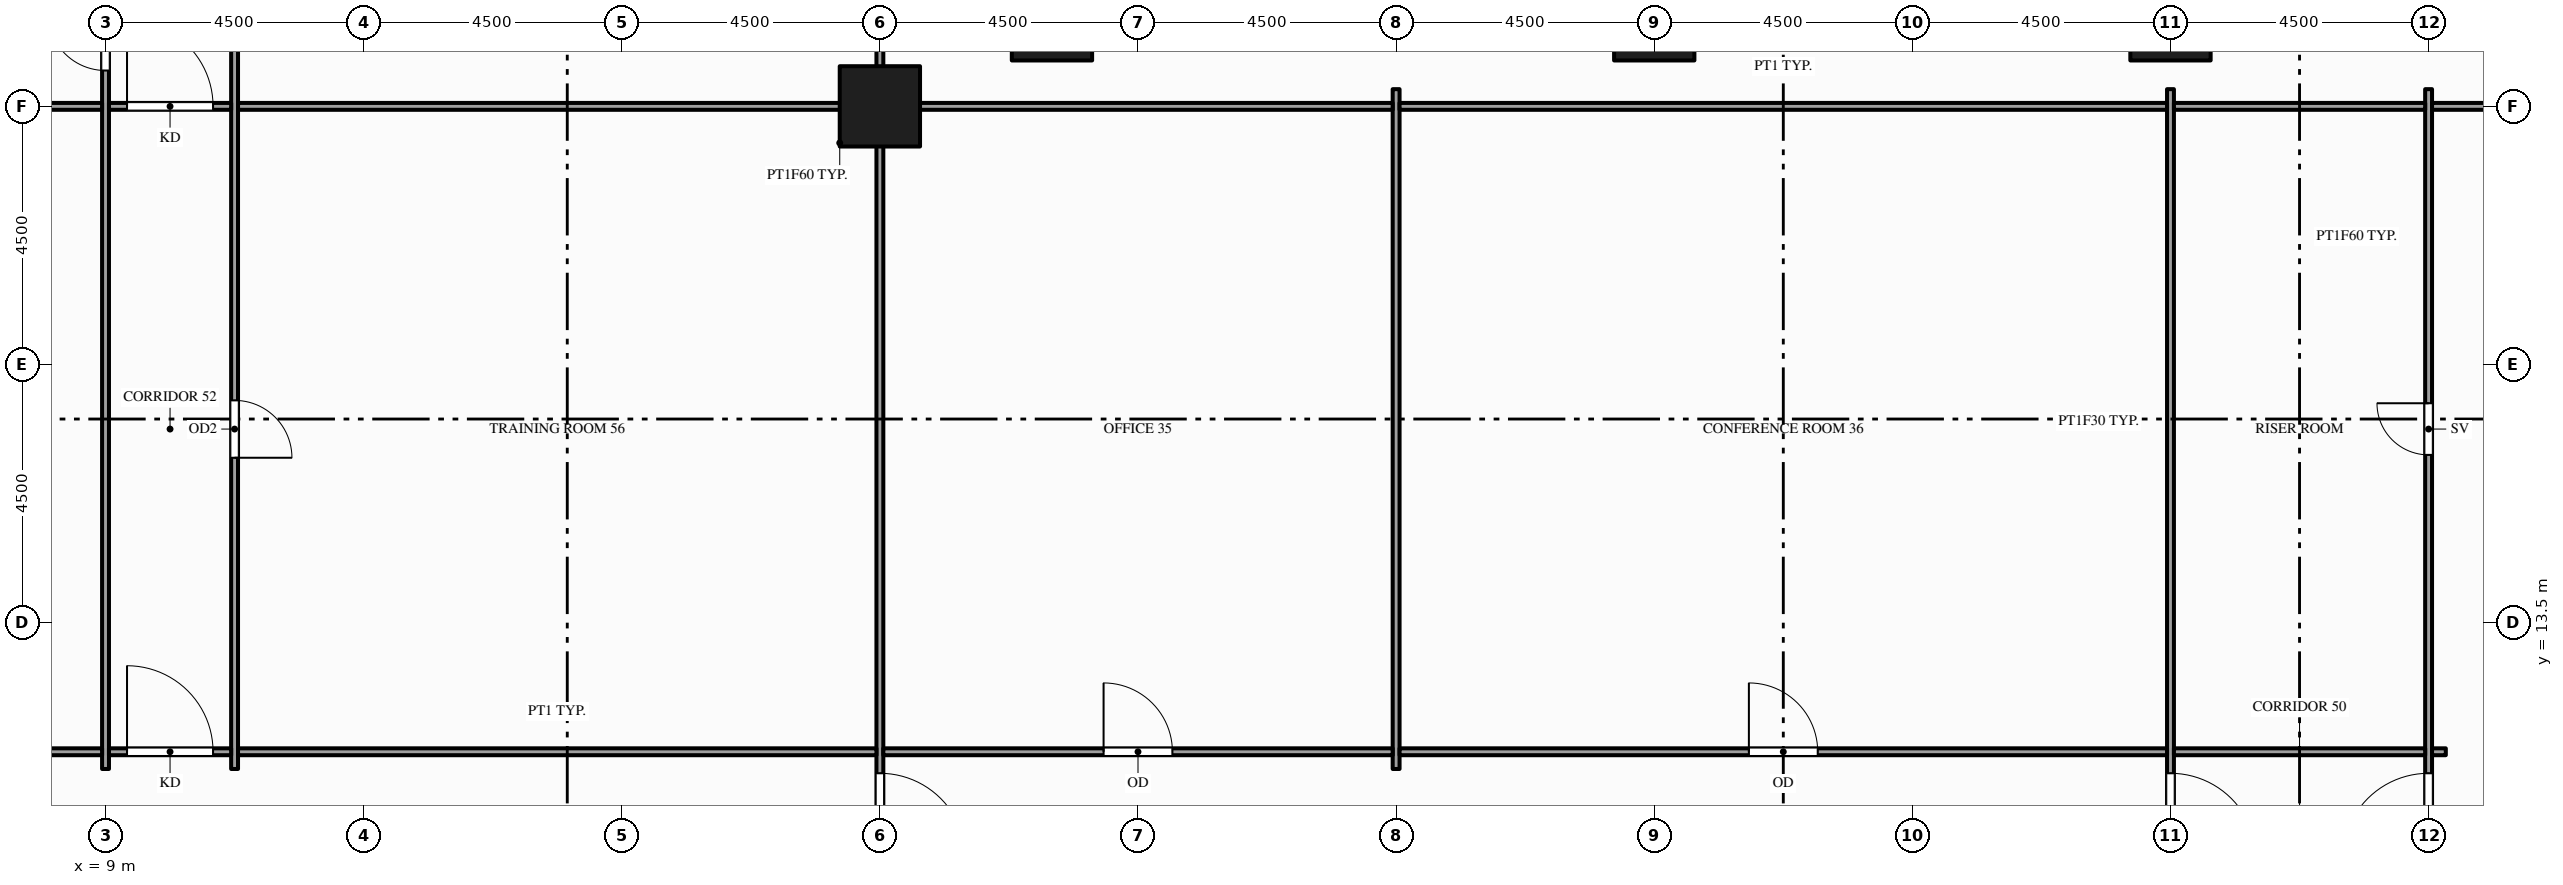
"""IFC4 building model, lengths in metres.
Left out: names, types, materials, properties, quantities, classifications, styles, units other than length and angle.
Written with IfcOpenShell. Run it as: python <this file> out.ifc"""

import sys

from ifc_helpers import new_model, si_unit, direction, frame, frame_2d, origin, origin_2d, place, context, subcontext, project, spatial, rectangle, hollow_rectangle, extrude, element, fill, save


model = new_model("IFC4")
c1 = context("Model", 3, precision=1e-05, world=origin(), true_north=direction((0.0, 1.0)))
c2 = subcontext(c1, "Body", "Model", "MODEL_VIEW")
j1 = project(units=[si_unit("LENGTHUNIT", "METRE"), si_unit("PLANEANGLEUNIT", "RADIAN")], contexts=[c1])
p1 = place(None, origin())
s1 = spatial("IfcSite", under=j1, at=p1, CompositionType="ELEMENT")
p2 = place(p1, origin())
s2 = spatial("IfcBuilding", under=s1, at=p2, CompositionType="ELEMENT")
p3 = place(p2, frame((0.0, 0.0, 8.0)))
s3 = spatial("IfcBuildingStorey", under=s2, at=p3, CompositionType="ELEMENT", Elevation=8.0)
for number, where, z_axis, x_axis in (
    (1, (22.5, 22.5, -0.25), (0.0, 0.0, 1.0), (1.0, 0.0, 0.0)),
    (2, (25.5, 24.0, -0.25), (0.0, 0.0, 1.0), (1.0, 0.0, 0.0)),
    (3, (36.0, 24.0, -0.25), (0.0, 0.0, 1.0), (1.0, 0.0, 0.0)),
    (4, (45.0, 24.0, -0.25), (0.0, 0.0, 1.0), (1.0, 0.0, 0.0)),
):
    element("IfcColumn", number, at=place(p3, frame(where, z_axis=z_axis, x_axis=x_axis)), inside=s3, PredefinedType="COLUMN", context=c2, shape_type="SweptSolid", body=[
        extrude(hollow_rectangle(XDim=1.4, YDim=1.4, WallThickness=0.08, at=origin_2d()), origin(), (0.0, 0.0, 1.0), 6.0),
    ])
p4 = place(p3, frame((9.0, 10.95, 0.0), z_axis=(0.0, 0.0, 1.0), x_axis=(0.0, 1.0, 0.0)))
e5 = element("IfcWall", 5, at=p4, inside=s3, PredefinedType="PARTITIONING", context=c2, shape_type="SweptSolid", body=[
    extrude(rectangle(XDim=20.85, YDim=0.12, at=frame_2d((10.425, 0.0))), origin(), (0.0, 0.0, 1.0), 4.5),
])
p5 = place(p4, frame((12.175, 0.0, 0.0)))
e6 = element("IfcOpeningElement", 6, at=p5, cuts=e5, PredefinedType="OPENING", context=c2, shape_type="SweptSolid", body=[
    extrude(rectangle(XDim=1.0, YDim=2.1, at=frame_2d((0.5, 1.05))), frame((0.0, 0.07, 0.0), z_axis=(0.0, -1.0, 0.0), x_axis=(1.0, 0.0, 0.0)), (0.0, 0.0, 1.0), 0.14),
])
p6 = place(p4, frame((15.55, 0.0, 0.0)))
e7 = element("IfcOpeningElement", 7, at=p6, cuts=e5, PredefinedType="OPENING", context=c2, shape_type="SweptSolid", body=[
    extrude(rectangle(XDim=1.0, YDim=2.1, at=frame_2d((0.5, 1.05))), frame((0.0, 0.07, 0.0), z_axis=(0.0, -1.0, 0.0), x_axis=(1.0, 0.0, 0.0)), (0.0, 0.0, 1.0), 0.14),
])
p7 = place(p4, frame((18.925, 0.0, 0.0)))
e8 = element("IfcOpeningElement", 8, at=p7, cuts=e5, PredefinedType="OPENING", context=c2, shape_type="SweptSolid", body=[
    extrude(rectangle(XDim=1.0, YDim=2.1, at=frame_2d((0.5, 1.05))), frame((0.0, 0.07, 0.0), z_axis=(0.0, -1.0, 0.0), x_axis=(1.0, 0.0, 0.0)), (0.0, 0.0, 1.0), 0.14),
])
p8 = place(p3, frame((11.25, 10.95, 0.0), z_axis=(0.0, 0.0, 1.0), x_axis=(0.0, 1.0, 0.0)))
e9 = element("IfcWall", 9, at=p8, inside=s3, PredefinedType="PARTITIONING", context=c2, shape_type="SweptSolid", body=[
    extrude(rectangle(XDim=20.85, YDim=0.12, at=frame_2d((10.425, 0.0))), origin(), (0.0, 0.0, 1.0), 4.5),
])
p9 = place(p8, frame((5.425, 0.0, 0.0)))
e10 = element("IfcOpeningElement", 10, at=p9, cuts=e9, PredefinedType="OPENING", context=c2, shape_type="SweptSolid", body=[
    extrude(rectangle(XDim=1.0, YDim=2.1, at=frame_2d((0.5, 1.05))), frame((0.0, 0.07, 0.0), z_axis=(0.0, -1.0, 0.0), x_axis=(1.0, 0.0, 0.0)), (0.0, 0.0, 1.0), 0.14),
])
p10 = place(p8, frame((13.3, 0.0, 0.0)))
e11 = element("IfcOpeningElement", 11, at=p10, cuts=e9, PredefinedType="OPENING", context=c2, shape_type="SweptSolid", body=[
    extrude(rectangle(XDim=1.0, YDim=2.1, at=frame_2d((0.5, 1.05))), frame((0.0, 0.07, 0.0), z_axis=(0.0, -1.0, 0.0), x_axis=(1.0, 0.0, 0.0)), (0.0, 0.0, 1.0), 0.14),
])
p11 = place(p8, frame((17.8, 0.0, 0.0)))
e12 = element("IfcOpeningElement", 12, at=p11, cuts=e9, PredefinedType="OPENING", context=c2, shape_type="SweptSolid", body=[
    extrude(rectangle(XDim=1.0, YDim=2.1, at=frame_2d((0.5, 1.05))), frame((0.0, 0.07, 0.0), z_axis=(0.0, -1.0, 0.0), x_axis=(1.0, 0.0, 0.0)), (0.0, 0.0, 1.0), 0.14),
])
p12 = place(p3, frame((22.5, 0.15, 0.0), z_axis=(0.0, 0.0, 1.0), x_axis=(0.0, 1.0, 0.0)))
e13 = element("IfcWall", 13, at=p12, inside=s3, PredefinedType="PARTITIONING", context=c2, shape_type="SweptSolid", body=[
    extrude(rectangle(XDim=35.95, YDim=0.12, at=frame_2d((17.975, 0.0))), origin(), (0.0, 0.0, 1.0), 4.759),
])
p13 = place(p12, frame((9.225, 0.0, 0.0)))
e14 = element("IfcOpeningElement", 14, at=p13, cuts=e13, PredefinedType="OPENING", context=c2, shape_type="SweptSolid", body=[
    extrude(rectangle(XDim=1.5, YDim=2.1, at=frame_2d((0.75, 1.05))), frame((0.0, 0.07, 0.0), z_axis=(0.0, -1.0, 0.0), x_axis=(1.0, 0.0, 0.0)), (0.0, 0.0, 1.0), 0.14),
])
p14 = place(p12, frame((32.7, 0.0, 0.0)))
e15 = element("IfcOpeningElement", 15, at=p14, cuts=e13, PredefinedType="OPENING", context=c2, shape_type="SweptSolid", body=[
    extrude(rectangle(XDim=1.8, YDim=2.1, at=frame_2d((0.9, 1.05))), frame((0.0, 0.07, 0.0), z_axis=(0.0, -1.0, 0.0), x_axis=(1.0, 0.0, 0.0)), (0.0, 0.0, 1.0), 0.14),
])
p15 = place(p3, frame((31.5, 10.95, 0.0), z_axis=(0.0, 0.0, 1.0), x_axis=(0.0, 1.0, 0.0)))
e16 = element("IfcWall", 16, at=p15, inside=s3, PredefinedType="PARTITIONING", context=c2, shape_type="SweptSolid", body=[
    extrude(rectangle(XDim=11.85, YDim=0.12, at=frame_2d((5.925, 0.0))), origin(), (0.0, 0.0, 1.0), 4.759),
])
p16 = place(p3, frame((45.0, 0.15, 0.0), z_axis=(0.0, 0.0, 1.0), x_axis=(0.0, 1.0, 0.0)))
e17 = element("IfcWall", 17, at=p16, inside=s3, PredefinedType="PARTITIONING", context=c2, shape_type="SweptSolid", body=[
    extrude(rectangle(XDim=22.65, YDim=0.12, at=frame_2d((11.325, 0.0))), origin(), (0.0, 0.0, 1.0), 4.759),
])
p17 = place(p16, frame((9.225, 0.0, 0.0)))
e18 = element("IfcOpeningElement", 18, at=p17, cuts=e17, PredefinedType="OPENING", context=c2, shape_type="SweptSolid", body=[
    extrude(rectangle(XDim=1.5, YDim=2.1, at=frame_2d((0.75, 1.05))), frame((0.0, 0.07, 0.0), z_axis=(0.0, -1.0, 0.0), x_axis=(1.0, 0.0, 0.0)), (0.0, 0.0, 1.0), 0.14),
])
p18 = place(p3, frame((49.5, 0.15, 0.0), z_axis=(0.0, 0.0, 1.0), x_axis=(0.0, 1.0, 0.0)))
e19 = element("IfcWall", 19, at=p18, inside=s3, PredefinedType="PARTITIONING", context=c2, shape_type="SweptSolid", body=[
    extrude(rectangle(XDim=22.65, YDim=0.12, at=frame_2d((11.325, 0.0))), origin(), (0.0, 0.0, 1.0), 4.759),
])
p19 = place(p18, frame((0.955, 0.0, 0.0)))
e20 = element("IfcOpeningElement", 20, at=p19, cuts=e19, PredefinedType="OPENING", context=c2, shape_type="SweptSolid", body=[
    extrude(rectangle(XDim=0.9, YDim=2.1, at=frame_2d((0.45, 1.05))), frame((0.0, 0.07, 0.0), z_axis=(0.0, -1.0, 0.0), x_axis=(1.0, 0.0, 0.0)), (0.0, 0.0, 1.0), 0.14),
])
p20 = place(p18, frame((3.9, 0.0, 0.0)))
e21 = element("IfcOpeningElement", 21, at=p20, cuts=e19, PredefinedType="OPENING", context=c2, shape_type="SweptSolid", body=[
    extrude(rectangle(XDim=0.9, YDim=2.1, at=frame_2d((0.45, 1.05))), frame((0.0, 0.07, 0.0), z_axis=(0.0, -1.0, 0.0), x_axis=(1.0, 0.0, 0.0)), (0.0, 0.0, 1.0), 0.14),
])
p21 = place(p18, frame((6.85, 0.0, 0.0)))
e22 = element("IfcOpeningElement", 22, at=p21, cuts=e19, PredefinedType="OPENING", context=c2, shape_type="SweptSolid", body=[
    extrude(rectangle(XDim=1.0, YDim=2.1, at=frame_2d((0.5, 1.05))), frame((0.0, 0.07, 0.0), z_axis=(0.0, -1.0, 0.0), x_axis=(1.0, 0.0, 0.0)), (0.0, 0.0, 1.0), 0.14),
])
p22 = place(p18, frame((16.275, 0.0, 0.0)))
e23 = element("IfcOpeningElement", 23, at=p22, cuts=e19, PredefinedType="OPENING", context=c2, shape_type="SweptSolid", body=[
    extrude(rectangle(XDim=0.9, YDim=2.1, at=frame_2d((0.45, 1.05))), frame((0.0, 0.07, 0.0), z_axis=(0.0, -1.0, 0.0), x_axis=(1.0, 0.0, 0.0)), (0.0, 0.0, 1.0), 0.14),
])
p23 = place(p18, frame((9.225, 0.0, 0.0)))
e24 = element("IfcOpeningElement", 24, at=p23, cuts=e19, PredefinedType="OPENING", context=c2, shape_type="SweptSolid", body=[
    extrude(rectangle(XDim=1.5, YDim=2.1, at=frame_2d((0.75, 1.05))), frame((0.0, 0.07, 0.0), z_axis=(0.0, -1.0, 0.0), x_axis=(1.0, 0.0, 0.0)), (0.0, 0.0, 1.0), 0.14),
])
p24 = place(p3, frame((0.15, 11.25, 0.0), z_axis=(0.0, 0.0, 1.0), x_axis=(1.0, 0.0, 0.0)))
e25 = element("IfcWall", 25, at=p24, inside=s3, PredefinedType="PARTITIONING", context=c2, shape_type="SweptSolid", body=[
    extrude(rectangle(XDim=8.79, YDim=0.12, at=frame_2d((4.395, 0.0))), origin(), (0.0, 0.0, 1.0), 4.759),
])
p25 = place(p24, frame((3.905, 0.0, 0.0)))
e26 = element("IfcOpeningElement", 26, at=p25, cuts=e25, PredefinedType="OPENING", context=c2, shape_type="SweptSolid", body=[
    extrude(rectangle(XDim=1.0, YDim=2.1, at=frame_2d((0.5, 1.05))), frame((0.0, 0.07, 0.0), z_axis=(0.0, -1.0, 0.0), x_axis=(1.0, 0.0, 0.0)), (0.0, 0.0, 1.0), 0.14),
])
p26 = place(p3, frame((9.06, 11.25, 0.0), z_axis=(0.0, 0.0, 1.0), x_axis=(1.0, 0.0, 0.0)))
e27 = element("IfcWall", 27, at=p26, inside=s3, PredefinedType="PARTITIONING", context=c2, shape_type="SweptSolid", body=[
    extrude(rectangle(XDim=2.13, YDim=0.12, at=frame_2d((1.065, 0.0))), origin(), (0.0, 0.0, 1.0), 4.759),
])
p27 = place(p26, frame((0.315, 0.0, 0.0)))
e28 = element("IfcOpeningElement", 28, at=p27, cuts=e27, PredefinedType="OPENING", context=c2, shape_type="SweptSolid", body=[
    extrude(rectangle(XDim=1.5, YDim=2.1, at=frame_2d((0.75, 1.05))), frame((0.0, 0.07, 0.0), z_axis=(0.0, -1.0, 0.0), x_axis=(1.0, 0.0, 0.0)), (0.0, 0.0, 1.0), 0.14),
])
p28 = place(p3, frame((11.31, 11.25, 0.0), z_axis=(0.0, 0.0, 1.0), x_axis=(1.0, 0.0, 0.0)))
e29 = element("IfcWall", 29, at=p28, inside=s3, PredefinedType="PARTITIONING", context=c2, shape_type="SweptSolid", body=[
    extrude(rectangle(XDim=11.13, YDim=0.12, at=frame_2d((5.565, 0.0))), origin(), (0.0, 0.0, 1.0), 4.759),
])
p29 = place(p3, frame((22.56, 11.25, 0.0), z_axis=(0.0, 0.0, 1.0), x_axis=(1.0, 0.0, 0.0)))
e30 = element("IfcWall", 30, at=p29, inside=s3, PredefinedType="PARTITIONING", context=c2, shape_type="SweptSolid", body=[
    extrude(rectangle(XDim=8.88, YDim=0.12, at=frame_2d((4.44, 0.0))), origin(), (0.0, 0.0, 1.0), 4.66),
])
p30 = place(p29, frame((3.84, 0.0, 0.0)))
e31 = element("IfcOpeningElement", 31, at=p30, cuts=e30, PredefinedType="OPENING", context=c2, shape_type="SweptSolid", body=[
    extrude(rectangle(XDim=1.2, YDim=2.1, at=frame_2d((0.6, 1.05))), frame((0.0, 0.07, 0.0), z_axis=(0.0, -1.0, 0.0), x_axis=(1.0, 0.0, 0.0)), (0.0, 0.0, 1.0), 0.14),
])
p31 = place(p3, frame((31.56, 11.25, 0.0), z_axis=(0.0, 0.0, 1.0), x_axis=(1.0, 0.0, 0.0)))
e32 = element("IfcWall", 32, at=p31, inside=s3, PredefinedType="PARTITIONING", context=c2, shape_type="SweptSolid", body=[
    extrude(rectangle(XDim=13.38, YDim=0.12, at=frame_2d((6.69, 0.0))), origin(), (0.0, 0.0, 1.0), 4.66),
])
p32 = place(p31, frame((6.09, 0.0, 0.0)))
e33 = element("IfcOpeningElement", 33, at=p32, cuts=e32, PredefinedType="OPENING", context=c2, shape_type="SweptSolid", body=[
    extrude(rectangle(XDim=1.2, YDim=2.1, at=frame_2d((0.6, 1.05))), frame((0.0, 0.07, 0.0), z_axis=(0.0, -1.0, 0.0), x_axis=(1.0, 0.0, 0.0)), (0.0, 0.0, 1.0), 0.14),
])
p33 = place(p3, frame((45.06, 11.25, 0.0), z_axis=(0.0, 0.0, 1.0), x_axis=(1.0, 0.0, 0.0)))
e34 = element("IfcWall", 34, at=p33, inside=s3, PredefinedType="PARTITIONING", context=c2, shape_type="SweptSolid", body=[
    extrude(rectangle(XDim=4.38, YDim=0.12, at=frame_2d((2.19, 0.0))), origin(), (0.0, 0.0, 1.0), 4.66),
])
p34 = place(p3, frame((49.56, 11.25, 0.0), z_axis=(0.0, 0.0, 1.0), x_axis=(1.0, 0.0, 0.0)))
e35 = element("IfcWall", 35, at=p34, inside=s3, PredefinedType="PARTITIONING", context=c2, shape_type="SweptSolid", body=[
    extrude(rectangle(XDim=0.24, YDim=0.12, at=frame_2d((0.12, 0.0))), origin(), (0.0, 0.0, 1.0), 4.759),
])
p35 = place(p3, frame((0.15, 22.5, 0.0), z_axis=(0.0, 0.0, 1.0), x_axis=(1.0, 0.0, 0.0)))
e36 = element("IfcWall", 36, at=p35, inside=s3, PredefinedType="PARTITIONING", context=c2, shape_type="SweptSolid", body=[
    extrude(rectangle(XDim=8.79, YDim=0.12, at=frame_2d((4.395, 0.0))), origin(), (0.0, 0.0, 1.0), 4.5),
])
p36 = place(p3, frame((9.06, 22.5, 0.0), z_axis=(0.0, 0.0, 1.0), x_axis=(1.0, 0.0, 0.0)))
e37 = element("IfcWall", 37, at=p36, inside=s3, PredefinedType="PARTITIONING", context=c2, shape_type="SweptSolid", body=[
    extrude(rectangle(XDim=2.13, YDim=0.12, at=frame_2d((1.065, 0.0))), origin(), (0.0, 0.0, 1.0), 4.5),
])
p37 = place(p36, frame((0.315, 0.0, 0.0)))
e38 = element("IfcOpeningElement", 38, at=p37, cuts=e37, PredefinedType="OPENING", context=c2, shape_type="SweptSolid", body=[
    extrude(rectangle(XDim=1.5, YDim=2.1, at=frame_2d((0.75, 1.05))), frame((0.0, 0.07, 0.0), z_axis=(0.0, -1.0, 0.0), x_axis=(1.0, 0.0, 0.0)), (0.0, 0.0, 1.0), 0.14),
])
p38 = place(p3, frame((11.31, 22.5, 0.0), z_axis=(0.0, 0.0, 1.0), x_axis=(1.0, 0.0, 0.0)))
e39 = element("IfcWall", 39, at=p38, inside=s3, PredefinedType="PARTITIONING", context=c2, shape_type="SweptSolid", body=[
    extrude(rectangle(XDim=11.13, YDim=0.12, at=frame_2d((5.565, 0.0))), origin(), (0.0, 0.0, 1.0), 4.5),
])
p39 = place(p3, frame((22.56, 22.5, 0.0), z_axis=(0.0, 0.0, 1.0), x_axis=(1.0, 0.0, 0.0)))
e40 = element("IfcWall", 40, at=p39, inside=s3, PredefinedType="PARTITIONING", context=c2, shape_type="SweptSolid", body=[
    extrude(rectangle(XDim=8.88, YDim=0.12, at=frame_2d((4.44, 0.0))), origin(), (0.0, 0.0, 1.0), 4.66),
])
p40 = place(p3, frame((31.56, 22.5, 0.0), z_axis=(0.0, 0.0, 1.0), x_axis=(1.0, 0.0, 0.0)))
e41 = element("IfcWall", 41, at=p40, inside=s3, PredefinedType="PARTITIONING", context=c2, shape_type="SweptSolid", body=[
    extrude(rectangle(XDim=13.38, YDim=0.12, at=frame_2d((6.69, 0.0))), origin(), (0.0, 0.0, 1.0), 4.66),
])
p41 = place(p3, frame((45.06, 22.5, 0.0), z_axis=(0.0, 0.0, 1.0), x_axis=(1.0, 0.0, 0.0)))
e42 = element("IfcWall", 42, at=p41, inside=s3, PredefinedType="PARTITIONING", context=c2, shape_type="SweptSolid", body=[
    extrude(rectangle(XDim=4.38, YDim=0.12, at=frame_2d((2.19, 0.0))), origin(), (0.0, 0.0, 1.0), 4.66),
])
p42 = place(p3, frame((49.56, 22.5, 0.0), z_axis=(0.0, 0.0, 1.0), x_axis=(1.0, 0.0, 0.0)))
e43 = element("IfcWall", 43, at=p42, inside=s3, PredefinedType="PARTITIONING", context=c2, shape_type="SweptSolid", body=[
    extrude(rectangle(XDim=4.54, YDim=0.12, at=frame_2d((2.27, 0.0))), origin(), (0.0, 0.0, 1.0), 4.66),
])
p43 = place(p42, frame((1.29, 0.0, 0.0)))
e44 = element("IfcOpeningElement", 44, at=p43, cuts=e43, PredefinedType="OPENING", context=c2, shape_type="SweptSolid", body=[
    extrude(rectangle(XDim=1.8, YDim=2.1, at=frame_2d((0.9, 1.05))), frame((0.0, 0.07, 0.0), z_axis=(0.0, -1.0, 0.0), x_axis=(1.0, 0.0, 0.0)), (0.0, 0.0, 1.0), 0.14),
])
p44 = place(p22, origin())
e45 = element("IfcDoor", 45, at=p44, inside=s3, OperationType="SINGLE_SWING_RIGHT", PredefinedType="DOOR", context=c2, shape_type="SweptSolid", body=[
    extrude(rectangle(XDim=0.9, YDim=2.1, at=frame_2d((0.45, 1.05))), frame((0.0, 0.025, 0.0), z_axis=(0.0, -1.0, 0.0), x_axis=(1.0, 0.0, 0.0)), (0.0, 0.0, 1.0), 0.05),
])
fill(e23, e45)
p45 = place(p23, origin())
e46 = element("IfcDoor", 46, at=p45, inside=s3, OperationType="SINGLE_SWING_LEFT", PredefinedType="DOOR", context=c2, shape_type="SweptSolid", body=[
    extrude(rectangle(XDim=1.5, YDim=2.1, at=frame_2d((0.75, 1.05))), frame((0.0, 0.025, 0.0), z_axis=(0.0, -1.0, 0.0), x_axis=(1.0, 0.0, 0.0)), (0.0, 0.0, 1.0), 0.05),
])
fill(e24, e46)
p46 = place(p17, origin())
e47 = element("IfcDoor", 47, at=p46, inside=s3, OperationType="SINGLE_SWING_LEFT", PredefinedType="DOOR", context=c2, shape_type="SweptSolid", body=[
    extrude(rectangle(XDim=1.5, YDim=2.1, at=frame_2d((0.75, 1.05))), frame((0.0, 0.025, 0.0), z_axis=(0.0, -1.0, 0.0), x_axis=(1.0, 0.0, 0.0)), (0.0, 0.0, 1.0), 0.05),
])
fill(e18, e47)
p47 = place(p30, origin())
e48 = element("IfcDoor", 48, at=p47, inside=s3, OperationType="SINGLE_SWING_LEFT", PredefinedType="DOOR", context=c2, shape_type="SweptSolid", body=[
    extrude(rectangle(XDim=1.2, YDim=2.1, at=frame_2d((0.6, 1.05))), frame((0.0, 0.025, 0.0), z_axis=(0.0, -1.0, 0.0), x_axis=(1.0, 0.0, 0.0)), (0.0, 0.0, 1.0), 0.05),
])
fill(e31, e48)
p48 = place(p32, origin())
e49 = element("IfcDoor", 49, at=p48, inside=s3, OperationType="SINGLE_SWING_LEFT", PredefinedType="DOOR", context=c2, shape_type="SweptSolid", body=[
    extrude(rectangle(XDim=1.2, YDim=2.1, at=frame_2d((0.6, 1.05))), frame((0.0, 0.025, 0.0), z_axis=(0.0, -1.0, 0.0), x_axis=(1.0, 0.0, 0.0)), (0.0, 0.0, 1.0), 0.05),
])
fill(e33, e49)
p49 = place(p13, origin())
e50 = element("IfcDoor", 50, at=p49, inside=s3, OperationType="SINGLE_SWING_LEFT", PredefinedType="DOOR", context=c2, shape_type="SweptSolid", body=[
    extrude(rectangle(XDim=1.5, YDim=2.1, at=frame_2d((0.75, 1.05))), frame((0.0, 0.025, 0.0), z_axis=(0.0, -1.0, 0.0), x_axis=(1.0, 0.0, 0.0)), (0.0, 0.0, 1.0), 0.05),
])
fill(e14, e50)
p50 = place(p27, origin())
e51 = element("IfcDoor", 51, at=p50, inside=s3, OperationType="SINGLE_SWING_LEFT", PredefinedType="DOOR", context=c2, shape_type="SweptSolid", body=[
    extrude(rectangle(XDim=1.5, YDim=2.1, at=frame_2d((0.75, 1.05))), frame((0.0, 0.025, 0.0), z_axis=(0.0, -1.0, 0.0), x_axis=(1.0, 0.0, 0.0)), (0.0, 0.0, 1.0), 0.05),
])
fill(e28, e51)
p51 = place(p9, origin())
e52 = element("IfcDoor", 52, at=p51, inside=s3, OperationType="SINGLE_SWING_LEFT", PredefinedType="DOOR", context=c2, shape_type="SweptSolid", body=[
    extrude(rectangle(XDim=1.0, YDim=2.1, at=frame_2d((0.5, 1.05))), frame((0.0, 0.025, 0.0), z_axis=(0.0, -1.0, 0.0), x_axis=(1.0, 0.0, 0.0)), (0.0, 0.0, 1.0), 0.05),
])
fill(e10, e52)
p52 = place(p37, origin())
e53 = element("IfcDoor", 53, at=p52, inside=s3, OperationType="SINGLE_SWING_LEFT", PredefinedType="DOOR", context=c2, shape_type="SweptSolid", body=[
    extrude(rectangle(XDim=1.5, YDim=2.1, at=frame_2d((0.75, 1.05))), frame((0.0, 0.025, 0.0), z_axis=(0.0, -1.0, 0.0), x_axis=(1.0, 0.0, 0.0)), (0.0, 0.0, 1.0), 0.05),
])
fill(e38, e53)
p53 = place(p5, origin())
e54 = element("IfcDoor", 54, at=p53, inside=s3, OperationType="SINGLE_SWING_RIGHT", PredefinedType="DOOR", context=c2, shape_type="SweptSolid", body=[
    extrude(rectangle(XDim=1.0, YDim=2.1, at=frame_2d((0.5, 1.05))), frame((0.0, 0.025, 0.0), z_axis=(0.0, -1.0, 0.0), x_axis=(1.0, 0.0, 0.0)), (0.0, 0.0, 1.0), 0.05),
])
fill(e6, e54)
save(model, sys.argv[1])
